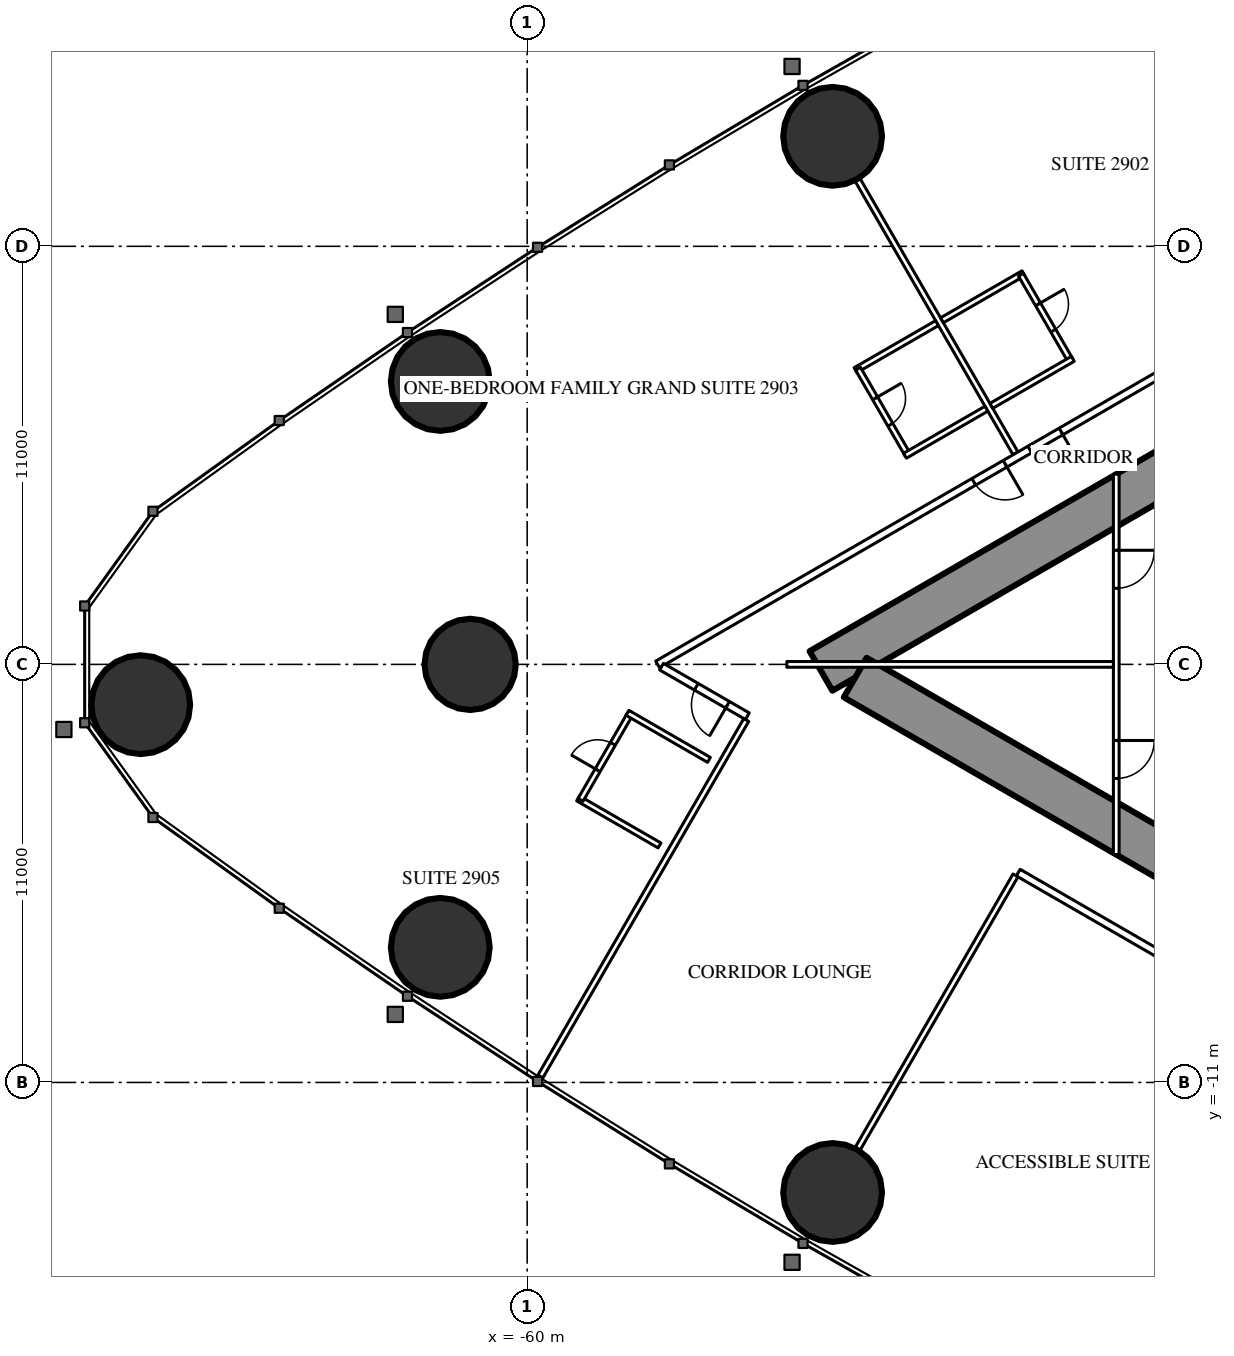
"""IFC4 building model, lengths in metres.
Left out: names, types, materials, properties, quantities, classifications, styles, units other than length and angle.
Written with IfcOpenShell. Run it as: python <this file> out.ifc"""

import sys

from ifc_helpers import new_model, si_unit, direction, frame, frame_2d, origin, origin_2d, place, context, subcontext, project, spatial, rectangle, circle, hollow_circle, extrude, element, fill, save


model = new_model("IFC4")
c1 = context("Model", 3, precision=1e-05, world=origin(), true_north=direction((0.0, 1.0)))
c2 = subcontext(c1, "Body", "Model", "MODEL_VIEW")
j1 = project(units=[si_unit("LENGTHUNIT", "METRE"), si_unit("PLANEANGLEUNIT", "RADIAN")], contexts=[c1])
p1 = place(None, origin())
s1 = spatial("IfcSite", under=j1, at=p1, CompositionType="ELEMENT")
p2 = place(p1, origin())
s2 = spatial("IfcBuilding", under=s1, at=p2, CompositionType="ELEMENT")
p3 = place(p2, frame((0.0, 0.0, 111.6)))
s3 = spatial("IfcBuildingStorey", under=s2, at=p3, CompositionType="ELEMENT", Elevation=111.6)
for number, where, z_axis, x_axis in (
    (1, (-70.168, -1.06, 0.0), (0.0, 0.0, 1.0), (1.0, 0.0, 0.0)),
    (2, (-62.287, -7.445, 0.0), (0.0, 0.0, 1.0), (1.0, 0.0, 0.0)),
    (3, (-51.963, -13.895, 0.0), (0.0, 0.0, 1.0), (1.0, 0.0, 0.0)),
    (4, (-51.963, 13.895, 0.0), (0.0, 0.0, 1.0), (1.0, 0.0, 0.0)),
    (5, (-62.287, 7.445, 0.0), (0.0, 0.0, 1.0), (1.0, 0.0, 0.0)),
):
    element("IfcColumn", number, at=place(p3, frame(where, z_axis=z_axis, x_axis=x_axis)), inside=s3, PredefinedType="COLUMN", context=c2, shape_type="SweptSolid", body=[
        extrude(hollow_circle(Radius=1.3, WallThickness=0.1, at=origin_2d()), origin(), (0.0, 0.0, 1.0), 3.5),
    ])
p4 = place(p3, frame((-61.5, 0.0, 0.0), z_axis=(0.0, 0.0, 1.0), x_axis=(1.0, 0.0, 0.0)))
e6 = element("IfcColumn", 6, at=p4, inside=s3, PredefinedType="COLUMN", context=c2, shape_type="SweptSolid", body=[
    extrude(circle(Radius=1.2, at=origin_2d()), origin(), (0.0, 0.0, 1.0), 3.5),
])
p5 = place(p3, frame((-27.2, 14.3, 0.0), z_axis=(0.0, 0.0, 1.0), x_axis=(-0.866026593062, -0.499997940104, 0.0)))
e7 = element("IfcWall", 7, at=p5, inside=s3, PredefinedType="SHEAR", context=c2, shape_type="SweptSolid", body=[
    extrude(rectangle(XDim=28.946, YDim=1.2, at=frame_2d((14.473, 0.0))), origin(), (0.0, 0.0, 1.0), 3.5),
])
p6 = place(p5, frame((4.6, 0.0, 0.0)))
e8 = element("IfcOpeningElement", 8, at=p6, cuts=e7, PredefinedType="OPENING", context=c2, shape_type="SweptSolid", body=[
    extrude(rectangle(XDim=1.0, YDim=2.2, at=frame_2d((0.5, 1.1))), frame((0.0, 0.61, 0.0), z_axis=(0.0, -1.0, 0.0), x_axis=(1.0, 0.0, 0.0)), (0.0, 0.0, 1.0), 1.22),
])
p7 = place(p5, frame((13.395, 0.0, 0.0)))
e9 = element("IfcOpeningElement", 9, at=p7, cuts=e7, PredefinedType="OPENING", context=c2, shape_type="SweptSolid", body=[
    extrude(rectangle(XDim=1.8, YDim=2.2, at=frame_2d((0.9, 1.1))), frame((0.0, 0.61, 0.0), z_axis=(0.0, -1.0, 0.0), x_axis=(1.0, 0.0, 0.0)), (0.0, 0.0, 1.0), 1.22),
])
p8 = place(p3, frame((-27.2, -14.3, 0.0), z_axis=(0.0, 0.0, 1.0), x_axis=(-0.866024021859, 0.500002393557, 0.0)))
e10 = element("IfcWall", 10, at=p8, inside=s3, PredefinedType="SHEAR", context=c2, shape_type="SweptSolid", body=[
    extrude(rectangle(XDim=27.907, YDim=1.2, at=frame_2d((13.954, 0.0))), origin(), (0.0, 0.0, 1.0), 3.5),
])
p9 = place(p8, frame((4.6, 0.0, 0.0)))
e11 = element("IfcOpeningElement", 11, at=p9, cuts=e10, PredefinedType="OPENING", context=c2, shape_type="SweptSolid", body=[
    extrude(rectangle(XDim=1.0, YDim=2.2, at=frame_2d((0.5, 1.1))), frame((0.0, 0.61, 0.0), z_axis=(0.0, -1.0, 0.0), x_axis=(1.0, 0.0, 0.0)), (0.0, 0.0, 1.0), 1.22),
])
p10 = place(p8, frame((13.395, 0.0, 0.0)))
e12 = element("IfcOpeningElement", 12, at=p10, cuts=e10, PredefinedType="OPENING", context=c2, shape_type="SweptSolid", body=[
    extrude(rectangle(XDim=1.8, YDim=2.2, at=frame_2d((0.9, 1.1))), frame((0.0, 0.61, 0.0), z_axis=(0.0, -1.0, 0.0), x_axis=(1.0, 0.0, 0.0)), (0.0, 0.0, 1.0), 1.22),
])
for number, where, z_axis, x_axis in (
    (13, (-47.151, 5.552, 0.0), (0.0, 0.0, 1.0), (-0.5, 0.866, 0.0)),
    (14, (-47.151, -5.552, 0.0), (0.0, 0.0, 1.0), (-0.5, -0.866, 0.0)),
):
    element("IfcWall", number, at=place(p3, frame(where, z_axis=z_axis, x_axis=x_axis)), inside=s3, PredefinedType="PARTITIONING", context=c2, shape_type="SweptSolid", body=[
        extrude(rectangle(XDim=8.311, YDim=0.15, at=frame_2d((4.156, 0.0))), origin(), (0.0, 0.0, 1.0), 2.2),
    ])
p11 = place(p3, frame((-54.236, -1.462, 0.0), z_axis=(0.0, 0.0, 1.0), x_axis=(-0.499990351854, -0.866030974073, 0.0)))
e15 = element("IfcWall", 15, at=p11, inside=s3, PredefinedType="PARTITIONING", context=c2, shape_type="SweptSolid", body=[
    extrude(rectangle(XDim=10.834, YDim=0.15, at=frame_2d((5.417, 0.0))), origin(), (0.0, 0.0, 1.0), 3.25),
])
p12 = place(p3, frame((-37.7, 10.894, 0.0), z_axis=(0.0, 0.0, 1.0), x_axis=(-0.866027905338, -0.499995667157, 0.0)))
e16 = element("IfcWall", 16, at=p12, inside=s3, PredefinedType="PARTITIONING", context=c2, shape_type="SweptSolid", body=[
    extrude(rectangle(XDim=21.787, YDim=0.2, at=frame_2d((10.894, 0.0))), origin(), (0.0, 0.0, 1.0), 3.25),
])
p13 = place(p12, frame((11.23, 0.0, 0.0)))
e17 = element("IfcOpeningElement", 17, at=p13, cuts=e16, PredefinedType="OPENING", context=c2, shape_type="SweptSolid", body=[
    extrude(rectangle(XDim=0.95, YDim=2.2, at=frame_2d((0.475, 1.1))), frame((0.0, 0.11, 0.0), z_axis=(0.0, -1.0, 0.0), x_axis=(1.0, 0.0, 0.0)), (0.0, 0.0, 1.0), 0.22),
])
p14 = place(p12, frame((9.531, 0.0, 0.0)))
e18 = element("IfcOpeningElement", 18, at=p14, cuts=e16, PredefinedType="OPENING", context=c2, shape_type="SweptSolid", body=[
    extrude(rectangle(XDim=0.95, YDim=2.2, at=frame_2d((0.475, 1.1))), frame((0.0, 0.11, 0.0), z_axis=(0.0, -1.0, 0.0), x_axis=(1.0, 0.0, 0.0)), (0.0, 0.0, 1.0), 0.22),
])
p15 = place(p3, frame((-36.92, -11.344, 0.0), z_axis=(0.0, 0.0, 1.0), x_axis=(-0.866027897759, 0.499995680284, 0.0)))
e19 = element("IfcWall", 19, at=p15, inside=s3, PredefinedType="PARTITIONING", context=c2, shape_type="SweptSolid", body=[
    extrude(rectangle(XDim=11.731, YDim=0.2, at=frame_2d((5.865, 0.0))), origin(), (0.0, 0.0, 1.0), 3.25),
])
p16 = place(p15, frame((3.35, 0.0, 0.0)))
e20 = element("IfcOpeningElement", 20, at=p16, cuts=e19, PredefinedType="OPENING", context=c2, shape_type="SweptSolid", body=[
    extrude(rectangle(XDim=1.0, YDim=2.2, at=frame_2d((0.5, 1.1))), frame((0.0, 0.11, 0.0), z_axis=(0.0, -1.0, 0.0), x_axis=(1.0, 0.0, 0.0)), (0.0, 0.0, 1.0), 0.22),
])
p17 = place(p3, frame((-54.207, -1.363, 0.0), z_axis=(0.0, 0.0, 1.0), x_axis=(-0.866049872286, 0.499957616916, 0.0)))
e21 = element("IfcWall", 21, at=p17, inside=s3, PredefinedType="PARTITIONING", context=c2, shape_type="SweptSolid", body=[
    extrude(rectangle(XDim=2.606, YDim=0.2, at=frame_2d((1.303, 0.0))), origin(), (0.0, 0.0, 1.0), 3.25),
])
p18 = place(p17, frame((0.6, 0.0, 0.0)))
e22 = element("IfcOpeningElement", 22, at=p18, cuts=e21, PredefinedType="OPENING", context=c2, shape_type="SweptSolid", body=[
    extrude(rectangle(XDim=0.95, YDim=2.2, at=frame_2d((0.475, 1.1))), frame((0.0, 0.11, 0.0), z_axis=(0.0, -1.0, 0.0), x_axis=(1.0, 0.0, 0.0)), (0.0, 0.0, 1.0), 0.22),
])
p19 = place(p3, frame((-49.216, 8.979, 0.0), z_axis=(0.0, 0.0, 1.0), x_axis=(-0.866031185235, -0.4999899861, 0.0)))
e23 = element("IfcWall", 23, at=p19, inside=s3, PredefinedType="PARTITIONING", context=c2, shape_type="SweptSolid", body=[
    extrude(rectangle(XDim=2.475, YDim=0.15, at=frame_2d((1.238, 0.0))), origin(), (0.0, 0.0, 1.0), 3.25),
])
p20 = place(p3, frame((-49.995, 5.527, 0.0), z_axis=(0.0, 0.0, 1.0), x_axis=(-0.500006934395, 0.866021400173, 0.0)))
e24 = element("IfcWall", 24, at=p20, inside=s3, PredefinedType="PARTITIONING", context=c2, shape_type="SweptSolid", body=[
    extrude(rectangle(XDim=2.6, YDim=0.15, at=frame_2d((1.3, 0.0))), origin(), (0.0, 0.0, 1.0), 3.25),
])
p21 = place(p20, frame((0.9, 0.0, 0.0)))
e25 = element("IfcOpeningElement", 25, at=p21, cuts=e24, PredefinedType="OPENING", context=c2, shape_type="SweptSolid", body=[
    extrude(rectangle(XDim=0.8, YDim=2.2, at=frame_2d((0.4, 1.1))), frame((0.0, 0.085, 0.0), z_axis=(0.0, -1.0, 0.0), x_axis=(1.0, 0.0, 0.0)), (0.0, 0.0, 1.0), 0.17),
])
for number, where, z_axis, x_axis in (
    (26, (-47.916, 6.727, 0.0), (0.0, 0.0, 1.0), (-0.866, -0.5, 0.0)),
    (27, (-56.517, -4.764, 0.0), (0.0, 0.0, 1.0), (-0.866, 0.5, 0.0)),
):
    element("IfcWall", number, at=place(p3, frame(where, z_axis=z_axis, x_axis=x_axis)), inside=s3, PredefinedType="PARTITIONING", context=c2, shape_type="SweptSolid", body=[
        extrude(rectangle(XDim=2.475, YDim=0.15, at=frame_2d((1.238, 0.0))), origin(), (0.0, 0.0, 1.0), 3.25),
    ])
p22 = place(p3, frame((-57.296, -1.312, 0.0), z_axis=(0.0, 0.0, 1.0), x_axis=(-0.49997716683, -0.86603858612, 0.0)))
e28 = element("IfcWall", 28, at=p22, inside=s3, PredefinedType="PARTITIONING", context=c2, shape_type="SweptSolid", body=[
    extrude(rectangle(XDim=2.6, YDim=0.15, at=frame_2d((1.3, 0.0))), origin(), (0.0, 0.0, 1.0), 3.25),
])
p23 = place(p22, frame((0.9, 0.0, 0.0)))
e29 = element("IfcOpeningElement", 29, at=p23, cuts=e28, PredefinedType="OPENING", context=c2, shape_type="SweptSolid", body=[
    extrude(rectangle(XDim=0.8, YDim=2.2, at=frame_2d((0.4, 1.1))), frame((0.0, 0.085, 0.0), z_axis=(0.0, -1.0, 0.0), x_axis=(1.0, 0.0, 0.0)), (0.0, 0.0, 1.0), 0.17),
])
p24 = place(p3, frame((-55.217, -2.512, 0.0), z_axis=(0.0, 0.0, 1.0), x_axis=(-0.866031185235, 0.4999899861, 0.0)))
e30 = element("IfcWall", 30, at=p24, inside=s3, PredefinedType="PARTITIONING", context=c2, shape_type="SweptSolid", body=[
    extrude(rectangle(XDim=2.475, YDim=0.15, at=frame_2d((1.238, 0.0))), origin(), (0.0, 0.0, 1.0), 3.25),
])
p25 = place(p3, frame((-46.943, 10.292, 0.0), z_axis=(0.0, 0.0, 1.0), x_axis=(-0.866006523861, -0.500032699561, 0.0)))
e31 = element("IfcWall", 31, at=p25, inside=s3, PredefinedType="PARTITIONING", context=c2, shape_type="SweptSolid", body=[
    extrude(rectangle(XDim=2.475, YDim=0.15, at=frame_2d((1.237, 0.0))), origin(), (0.0, 0.0, 1.0), 3.25),
])
p26 = place(p3, frame((-45.708, 8.002, 0.0), z_axis=(0.0, 0.0, 1.0), x_axis=(-0.500047596559, 0.865997922154, 0.0)))
e32 = element("IfcWall", 32, at=p26, inside=s3, PredefinedType="PARTITIONING", context=c2, shape_type="SweptSolid", body=[
    extrude(rectangle(XDim=2.6, YDim=0.15, at=frame_2d((1.3, 0.0))), origin(), (0.0, 0.0, 1.0), 3.25),
])
p27 = place(p26, frame((0.9, 0.0, 0.0)))
e33 = element("IfcOpeningElement", 33, at=p27, cuts=e32, PredefinedType="OPENING", context=c2, shape_type="SweptSolid", body=[
    extrude(rectangle(XDim=0.8, YDim=2.2, at=frame_2d((0.4, 1.1))), frame((0.0, 0.085, 0.0), z_axis=(0.0, -1.0, 0.0), x_axis=(1.0, 0.0, 0.0)), (0.0, 0.0, 1.0), 0.17),
])
p28 = place(p3, frame((-45.643, 8.04, 0.0), z_axis=(0.0, 0.0, 1.0), x_axis=(-0.866006523861, -0.500032699561, 0.0)))
e34 = element("IfcWall", 34, at=p28, inside=s3, PredefinedType="PARTITIONING", context=c2, shape_type="SweptSolid", body=[
    extrude(rectangle(XDim=2.475, YDim=0.15, at=frame_2d((1.237, 0.0))), origin(), (0.0, 0.0, 1.0), 3.25),
])
p29 = place(p3, frame((-44.5, 5.005, 0.0), z_axis=(0.0, 0.0, 1.0), x_axis=(0.0, -1.0, 0.0)))
e35 = element("IfcWall", 35, at=p29, inside=s3, PredefinedType="PARTITIONING", context=c2, shape_type="SweptSolid", body=[
    extrude(rectangle(XDim=10.009, YDim=0.15, at=frame_2d((5.005, 0.0))), origin(), (0.0, 0.0, 1.0), 2.45),
])
p30 = place(p29, frame((2.002, 0.0, 0.0)))
e36 = element("IfcOpeningElement", 36, at=p30, cuts=e35, PredefinedType="OPENING", context=c2, shape_type="SweptSolid", body=[
    extrude(rectangle(XDim=1.0, YDim=2.2, at=frame_2d((0.5, 1.1))), frame((0.0, 0.085, 0.0), z_axis=(0.0, -1.0, 0.0), x_axis=(1.0, 0.0, 0.0)), (0.0, 0.0, 1.0), 0.17),
])
p31 = place(p29, frame((7.007, 0.0, 0.0)))
e37 = element("IfcOpeningElement", 37, at=p31, cuts=e35, PredefinedType="OPENING", context=c2, shape_type="SweptSolid", body=[
    extrude(rectangle(XDim=1.0, YDim=2.2, at=frame_2d((0.5, 1.1))), frame((0.0, 0.085, 0.0), z_axis=(0.0, -1.0, 0.0), x_axis=(1.0, 0.0, 0.0)), (0.0, 0.0, 1.0), 0.17),
])
p32 = place(p3, frame((-44.575, 0.0, 0.0), z_axis=(0.0, 0.0, 1.0), x_axis=(-1.0, 0.0, 0.0)))
e38 = element("IfcWall", 38, at=p32, inside=s3, PredefinedType="PARTITIONING", context=c2, shape_type="SweptSolid", body=[
    extrude(rectangle(XDim=8.593, YDim=0.15, at=frame_2d((4.297, 0.0))), origin(), (0.0, 0.0, 1.0), 2.2),
])
p33 = place(p21, origin())
e39 = element("IfcDoor", 39, at=p33, inside=s3, OperationType="SINGLE_SWING_RIGHT", PredefinedType="DOOR", context=c2, shape_type="SweptSolid", body=[
    extrude(rectangle(XDim=0.8, YDim=2.2, at=frame_2d((0.4, 1.1))), frame((0.0, 0.025, 0.0), z_axis=(0.0, -1.0, 0.0), x_axis=(1.0, 0.0, 0.0)), (0.0, 0.0, 1.0), 0.05),
])
fill(e25, e39)
p34 = place(p13, origin())
e40 = element("IfcDoor", 40, at=p34, inside=s3, OperationType="SINGLE_SWING_LEFT", PredefinedType="DOOR", context=c2, shape_type="SweptSolid", body=[
    extrude(rectangle(XDim=0.95, YDim=2.2, at=frame_2d((0.475, 1.1))), frame((0.0, 0.025, 0.0), z_axis=(0.0, -1.0, 0.0), x_axis=(1.0, 0.0, 0.0)), (0.0, 0.0, 1.0), 0.05),
])
fill(e17, e40)
p35 = place(p23, origin())
e41 = element("IfcDoor", 41, at=p35, inside=s3, OperationType="SINGLE_SWING_RIGHT", PredefinedType="DOOR", context=c2, shape_type="SweptSolid", body=[
    extrude(rectangle(XDim=0.8, YDim=2.2, at=frame_2d((0.4, 1.1))), frame((0.0, 0.025, 0.0), z_axis=(0.0, -1.0, 0.0), x_axis=(1.0, 0.0, 0.0)), (0.0, 0.0, 1.0), 0.05),
])
fill(e29, e41)
p36 = place(p18, origin())
e42 = element("IfcDoor", 42, at=p36, inside=s3, OperationType="SINGLE_SWING_LEFT", PredefinedType="DOOR", context=c2, shape_type="SweptSolid", body=[
    extrude(rectangle(XDim=0.95, YDim=2.2, at=frame_2d((0.475, 1.1))), frame((0.0, 0.025, 0.0), z_axis=(0.0, -1.0, 0.0), x_axis=(1.0, 0.0, 0.0)), (0.0, 0.0, 1.0), 0.05),
])
fill(e22, e42)
p37 = place(p27, origin())
e43 = element("IfcDoor", 43, at=p37, inside=s3, OperationType="SINGLE_SWING_RIGHT", PredefinedType="DOOR", context=c2, shape_type="SweptSolid", body=[
    extrude(rectangle(XDim=0.8, YDim=2.2, at=frame_2d((0.4, 1.1))), frame((0.0, 0.025, 0.0), z_axis=(0.0, -1.0, 0.0), x_axis=(1.0, 0.0, 0.0)), (0.0, 0.0, 1.0), 0.05),
])
fill(e33, e43)
p38 = place(p14, origin())
e44 = element("IfcDoor", 44, at=p38, inside=s3, OperationType="SINGLE_SWING_LEFT", PredefinedType="DOOR", context=c2, shape_type="SweptSolid", body=[
    extrude(rectangle(XDim=0.95, YDim=2.2, at=frame_2d((0.475, 1.1))), frame((0.0, 0.025, 0.0), z_axis=(0.0, -1.0, 0.0), x_axis=(1.0, 0.0, 0.0)), (0.0, 0.0, 1.0), 0.05),
])
fill(e18, e44)
p39 = place(p30, origin())
e45 = element("IfcDoor", 45, at=p39, inside=s3, OperationType="SINGLE_SWING_LEFT", PredefinedType="DOOR", context=c2, shape_type="SweptSolid", body=[
    extrude(rectangle(XDim=1.0, YDim=2.2, at=frame_2d((0.5, 1.1))), frame((0.0, 0.025, 0.0), z_axis=(0.0, -1.0, 0.0), x_axis=(1.0, 0.0, 0.0)), (0.0, 0.0, 1.0), 0.05),
])
fill(e36, e45)
p40 = place(p31, origin())
e46 = element("IfcDoor", 46, at=p40, inside=s3, OperationType="SINGLE_SWING_LEFT", PredefinedType="DOOR", context=c2, shape_type="SweptSolid", body=[
    extrude(rectangle(XDim=1.0, YDim=2.2, at=frame_2d((0.5, 1.1))), frame((0.0, 0.025, 0.0), z_axis=(0.0, -1.0, 0.0), x_axis=(1.0, 0.0, 0.0)), (0.0, 0.0, 1.0), 0.05),
])
fill(e37, e46)
save(model, sys.argv[1])
